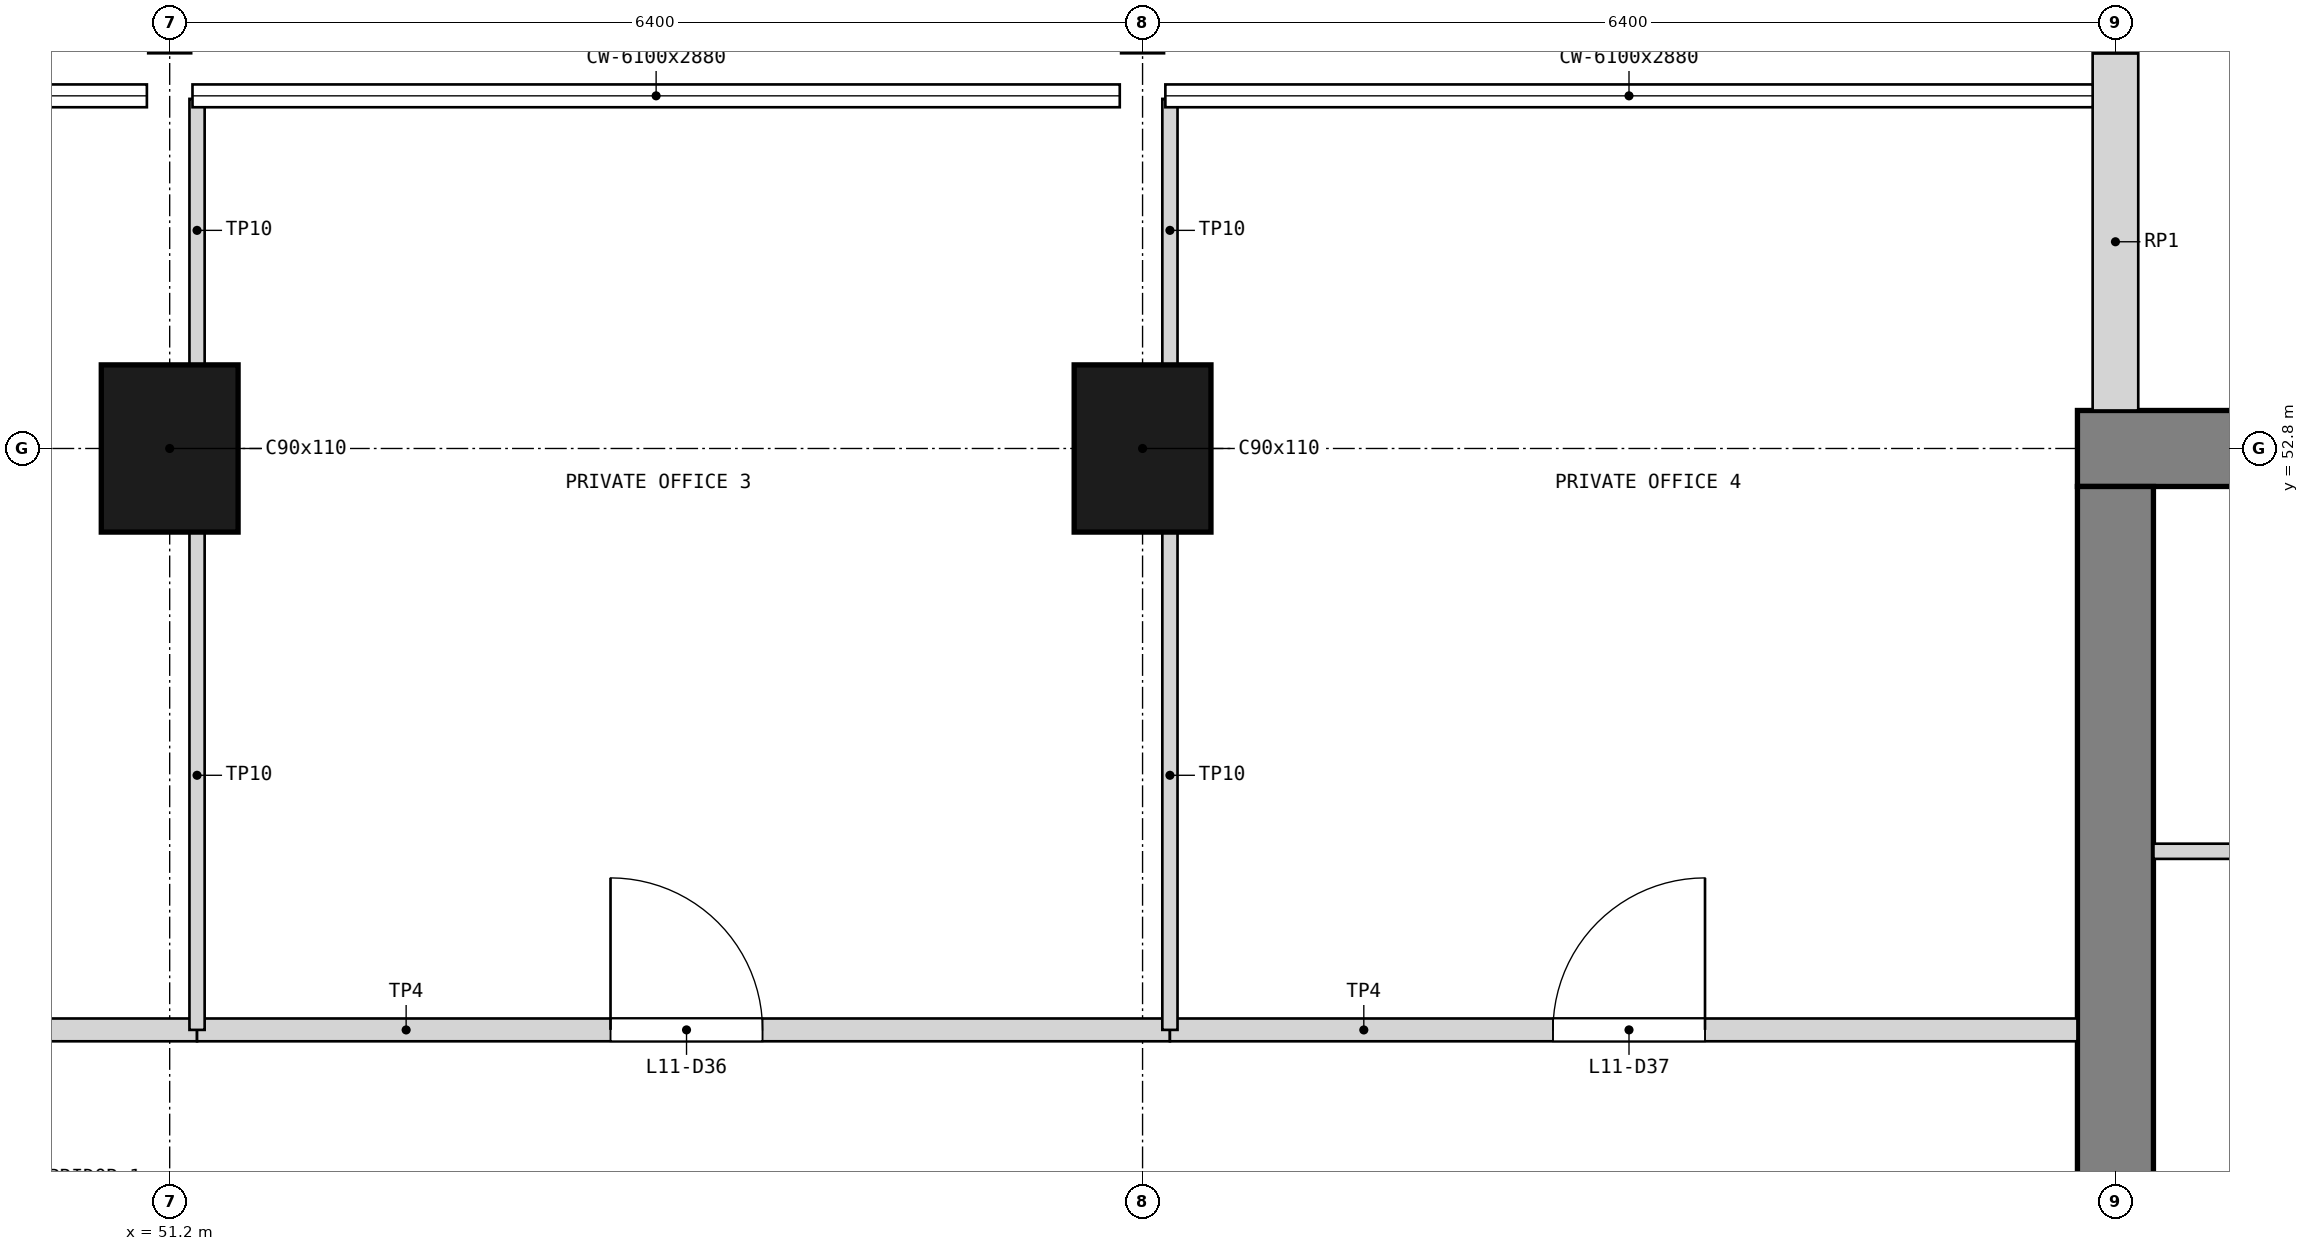
"""IFC4 building model, lengths in metres.
Left out: names, types, materials, properties, quantities, classifications, styles, units other than length and angle.
Written with IfcOpenShell. Run it as: python <this file> out.ifc"""

import sys

from ifc_helpers import new_model, si_unit, direction, frame, frame_2d, origin, origin_2d, place, context, subcontext, project, spatial, rectangle, extrude, element, fill, save


model = new_model("IFC4")
c1 = context("Model", 3, precision=1e-05, world=origin(), true_north=direction((0.0, 1.0)))
c2 = subcontext(c1, "Body", "Model", "MODEL_VIEW")
j1 = project(units=[si_unit("LENGTHUNIT", "METRE"), si_unit("PLANEANGLEUNIT", "RADIAN")], contexts=[c1])
p1 = place(None, origin())
s1 = spatial("IfcSite", under=j1, at=p1, CompositionType="ELEMENT")
p2 = place(p1, origin())
s2 = spatial("IfcBuilding", under=s1, at=p2, CompositionType="ELEMENT")
p3 = place(p2, frame((0.0, 0.0, 44.4)))
s3 = spatial("IfcBuildingStorey", under=s2, at=p3, CompositionType="ELEMENT", Elevation=44.4)
p4 = place(p3, frame((63.75, 52.8, 0.0), z_axis=(0.0, 0.0, 1.0), x_axis=(1.0, 0.0, 0.0)))
e1 = element("IfcWall", 1, at=p4, inside=s3, PredefinedType="SHEAR", context=c2, shape_type="SweptSolid", body=[
    extrude(rectangle(XDim=13.3, YDim=0.5, at=frame_2d((6.65, 0.0))), origin(), (0.0, 0.0, 1.0), 3.9),
])
p5 = place(p4, frame((11.05, 0.0, 1.0)))
e2 = element("IfcOpeningElement", 2, at=p5, cuts=e1, PredefinedType="OPENING", context=c2, shape_type="SweptSolid", body=[
    extrude(rectangle(XDim=0.4, YDim=2.0, at=frame_2d((0.2, 1.0))), frame((0.0, 0.26, 0.0), z_axis=(0.0, -1.0, 0.0), x_axis=(1.0, 0.0, 0.0)), (0.0, 0.0, 1.0), 0.52),
])
p6 = place(p3, frame((64.0, 33.85, 0.0), z_axis=(0.0, 0.0, 1.0), x_axis=(0.0, 1.0, 0.0)))
e3 = element("IfcWall", 3, at=p6, inside=s3, PredefinedType="SHEAR", context=c2, shape_type="SweptSolid", body=[
    extrude(rectangle(XDim=18.7, YDim=0.5, at=frame_2d((9.35, 0.0))), origin(), (0.0, 0.0, 1.0), 3.9),
])
p7 = place(p6, frame((8.35, 0.0, 0.0)))
e4 = element("IfcOpeningElement", 4, at=p7, cuts=e3, PredefinedType="OPENING", context=c2, shape_type="SweptSolid", body=[
    extrude(rectangle(XDim=2.0, YDim=2.1, at=frame_2d((1.0, 1.05))), frame((0.0, 0.26, 0.0), z_axis=(0.0, -1.0, 0.0), x_axis=(1.0, 0.0, 0.0)), (0.0, 0.0, 1.0), 0.52),
])
for number, where, z_axis, x_axis in (
    (5, (51.2, 52.8, 0.0), (0.0, 0.0, 1.0), (1.0, 0.0, 0.0)),
    (6, (57.6, 52.8, 0.0), (0.0, 0.0, 1.0), (1.0, 0.0, 0.0)),
):
    element("IfcColumn", number, at=place(p3, frame(where, z_axis=z_axis, x_axis=x_axis)), inside=s3, PredefinedType="COLUMN", context=c2, shape_type="SweptSolid", body=[
        extrude(rectangle(XDim=0.9, YDim=1.1, at=origin_2d()), origin(), (0.0, 0.0, 1.0), 3.9),
    ])
p8 = place(p3, frame((64.0, 53.05, 0.0), z_axis=(0.0, 0.0, 1.0), x_axis=(0.0, 1.0, 0.0)))
e7 = element("IfcWall", 7, at=p8, inside=s3, PredefinedType="SOLIDWALL", context=c2, shape_type="SweptSolid", body=[
    extrude(rectangle(XDim=2.35, YDim=0.3, at=frame_2d((1.175, 0.0))), origin(), (0.0, 0.0, 1.0), 2.88),
])
p9 = place(p3, frame((69.475, 50.15, 0.0), z_axis=(0.0, 0.0, 1.0), x_axis=(-1.0, 0.0, 0.0)))
e8 = element("IfcWall", 8, at=p9, inside=s3, PredefinedType="PARTITIONING", context=c2, shape_type="SweptSolid", body=[
    extrude(rectangle(XDim=5.225, YDim=0.1, at=frame_2d((2.613, 0.0))), origin(), (0.0, 0.0, 1.0), 3.6),
])
p10 = place(p3, frame((44.62, 48.975, 0.0), z_axis=(0.0, 0.0, 1.0), x_axis=(1.0, 0.0, 0.0)))
e9 = element("IfcWall", 9, at=p10, inside=s3, PredefinedType="PARTITIONING", context=c2, shape_type="SweptSolid", body=[
    extrude(rectangle(XDim=6.76, YDim=0.15, at=frame_2d((3.38, 0.0))), origin(), (0.0, 0.0, 1.0), 3.68),
])
p11 = place(p10, frame((2.48, 0.0, 0.0)))
e10 = element("IfcOpeningElement", 10, at=p11, cuts=e9, PredefinedType="OPENING", context=c2, shape_type="SweptSolid", body=[
    extrude(rectangle(XDim=1.8, YDim=2.1, at=frame_2d((0.9, 1.05))), frame((0.0, 0.085, 0.0), z_axis=(0.0, -1.0, 0.0), x_axis=(1.0, 0.0, 0.0)), (0.0, 0.0, 1.0), 0.17),
])
p12 = place(p3, frame((51.38, 48.975, 0.0), z_axis=(0.0, 0.0, 1.0), x_axis=(1.0, 0.0, 0.0)))
e11 = element("IfcWall", 11, at=p12, inside=s3, PredefinedType="PARTITIONING", context=c2, shape_type="SweptSolid", body=[
    extrude(rectangle(XDim=6.4, YDim=0.15, at=frame_2d((3.2, 0.0))), origin(), (0.0, 0.0, 1.0), 3.68),
])
p13 = place(p12, frame((2.72, 0.0, 0.0)))
e12 = element("IfcOpeningElement", 12, at=p13, cuts=e11, PredefinedType="OPENING", context=c2, shape_type="SweptSolid", body=[
    extrude(rectangle(XDim=1.0, YDim=2.1, at=frame_2d((0.5, 1.05))), frame((0.0, 0.085, 0.0), z_axis=(0.0, -1.0, 0.0), x_axis=(1.0, 0.0, 0.0)), (0.0, 0.0, 1.0), 0.17),
])
p14 = place(p3, frame((57.78, 48.975, 0.0), z_axis=(0.0, 0.0, 1.0), x_axis=(1.0, 0.0, 0.0)))
e13 = element("IfcWall", 13, at=p14, inside=s3, PredefinedType="PARTITIONING", context=c2, shape_type="SweptSolid", body=[
    extrude(rectangle(XDim=5.97, YDim=0.15, at=frame_2d((2.985, 0.0))), origin(), (0.0, 0.0, 1.0), 3.68),
])
p15 = place(p14, frame((2.52, 0.0, 0.0)))
e14 = element("IfcOpeningElement", 14, at=p15, cuts=e13, PredefinedType="OPENING", context=c2, shape_type="SweptSolid", body=[
    extrude(rectangle(XDim=1.0, YDim=2.1, at=frame_2d((0.5, 1.05))), frame((0.0, 0.085, 0.0), z_axis=(0.0, -1.0, 0.0), x_axis=(1.0, 0.0, 0.0)), (0.0, 0.0, 1.0), 0.17),
])
p16 = place(p3, frame((51.38, 48.975, 0.0), z_axis=(0.0, 0.0, 1.0), x_axis=(0.0, 1.0, 0.0)))
e15 = element("IfcWall", 15, at=p16, inside=s3, PredefinedType="PARTITIONING", context=c2, shape_type="SweptSolid", body=[
    extrude(rectangle(XDim=3.295, YDim=0.1, at=frame_2d((1.647, 0.0))), origin(), (0.0, 0.0, 1.0), 2.78),
])
p17 = place(p3, frame((51.38, 53.33, 0.0), z_axis=(0.0, 0.0, 1.0), x_axis=(0.0, 1.0, 0.0)))
e16 = element("IfcWall", 16, at=p17, inside=s3, PredefinedType="PARTITIONING", context=c2, shape_type="SweptSolid", body=[
    extrude(rectangle(XDim=1.77, YDim=0.1, at=frame_2d((0.885, 0.0))), origin(), (0.0, 0.0, 1.0), 2.78),
])
p18 = place(p3, frame((57.78, 48.975, 0.0), z_axis=(0.0, 0.0, 1.0), x_axis=(0.0, 1.0, 0.0)))
e17 = element("IfcWall", 17, at=p18, inside=s3, PredefinedType="PARTITIONING", context=c2, shape_type="SweptSolid", body=[
    extrude(rectangle(XDim=3.295, YDim=0.1, at=frame_2d((1.647, 0.0))), origin(), (0.0, 0.0, 1.0), 2.78),
])
p19 = place(p3, frame((57.78, 53.33, 0.0), z_axis=(0.0, 0.0, 1.0), x_axis=(0.0, 1.0, 0.0)))
e18 = element("IfcWall", 18, at=p19, inside=s3, PredefinedType="PARTITIONING", context=c2, shape_type="SweptSolid", body=[
    extrude(rectangle(XDim=1.77, YDim=0.1, at=frame_2d((0.885, 0.0))), origin(), (0.0, 0.0, 1.0), 2.78),
])
p20 = place(p13, origin())
e19 = element("IfcDoor", 19, at=p20, inside=s3, OperationType="SINGLE_SWING_LEFT", PredefinedType="DOOR", context=c2, shape_type="SweptSolid", body=[
    extrude(rectangle(XDim=1.0, YDim=2.1, at=frame_2d((0.5, 1.05))), frame((0.0, 0.025, 0.0), z_axis=(0.0, -1.0, 0.0), x_axis=(1.0, 0.0, 0.0)), (0.0, 0.0, 1.0), 0.05),
])
fill(e12, e19)
p21 = place(p15, origin())
e20 = element("IfcDoor", 20, at=p21, inside=s3, OperationType="SINGLE_SWING_RIGHT", PredefinedType="DOOR", context=c2, shape_type="SweptSolid", body=[
    extrude(rectangle(XDim=1.0, YDim=2.1, at=frame_2d((0.5, 1.05))), frame((0.0, 0.025, 0.0), z_axis=(0.0, -1.0, 0.0), x_axis=(1.0, 0.0, 0.0)), (0.0, 0.0, 1.0), 0.05),
])
fill(e14, e20)
save(model, sys.argv[1])
